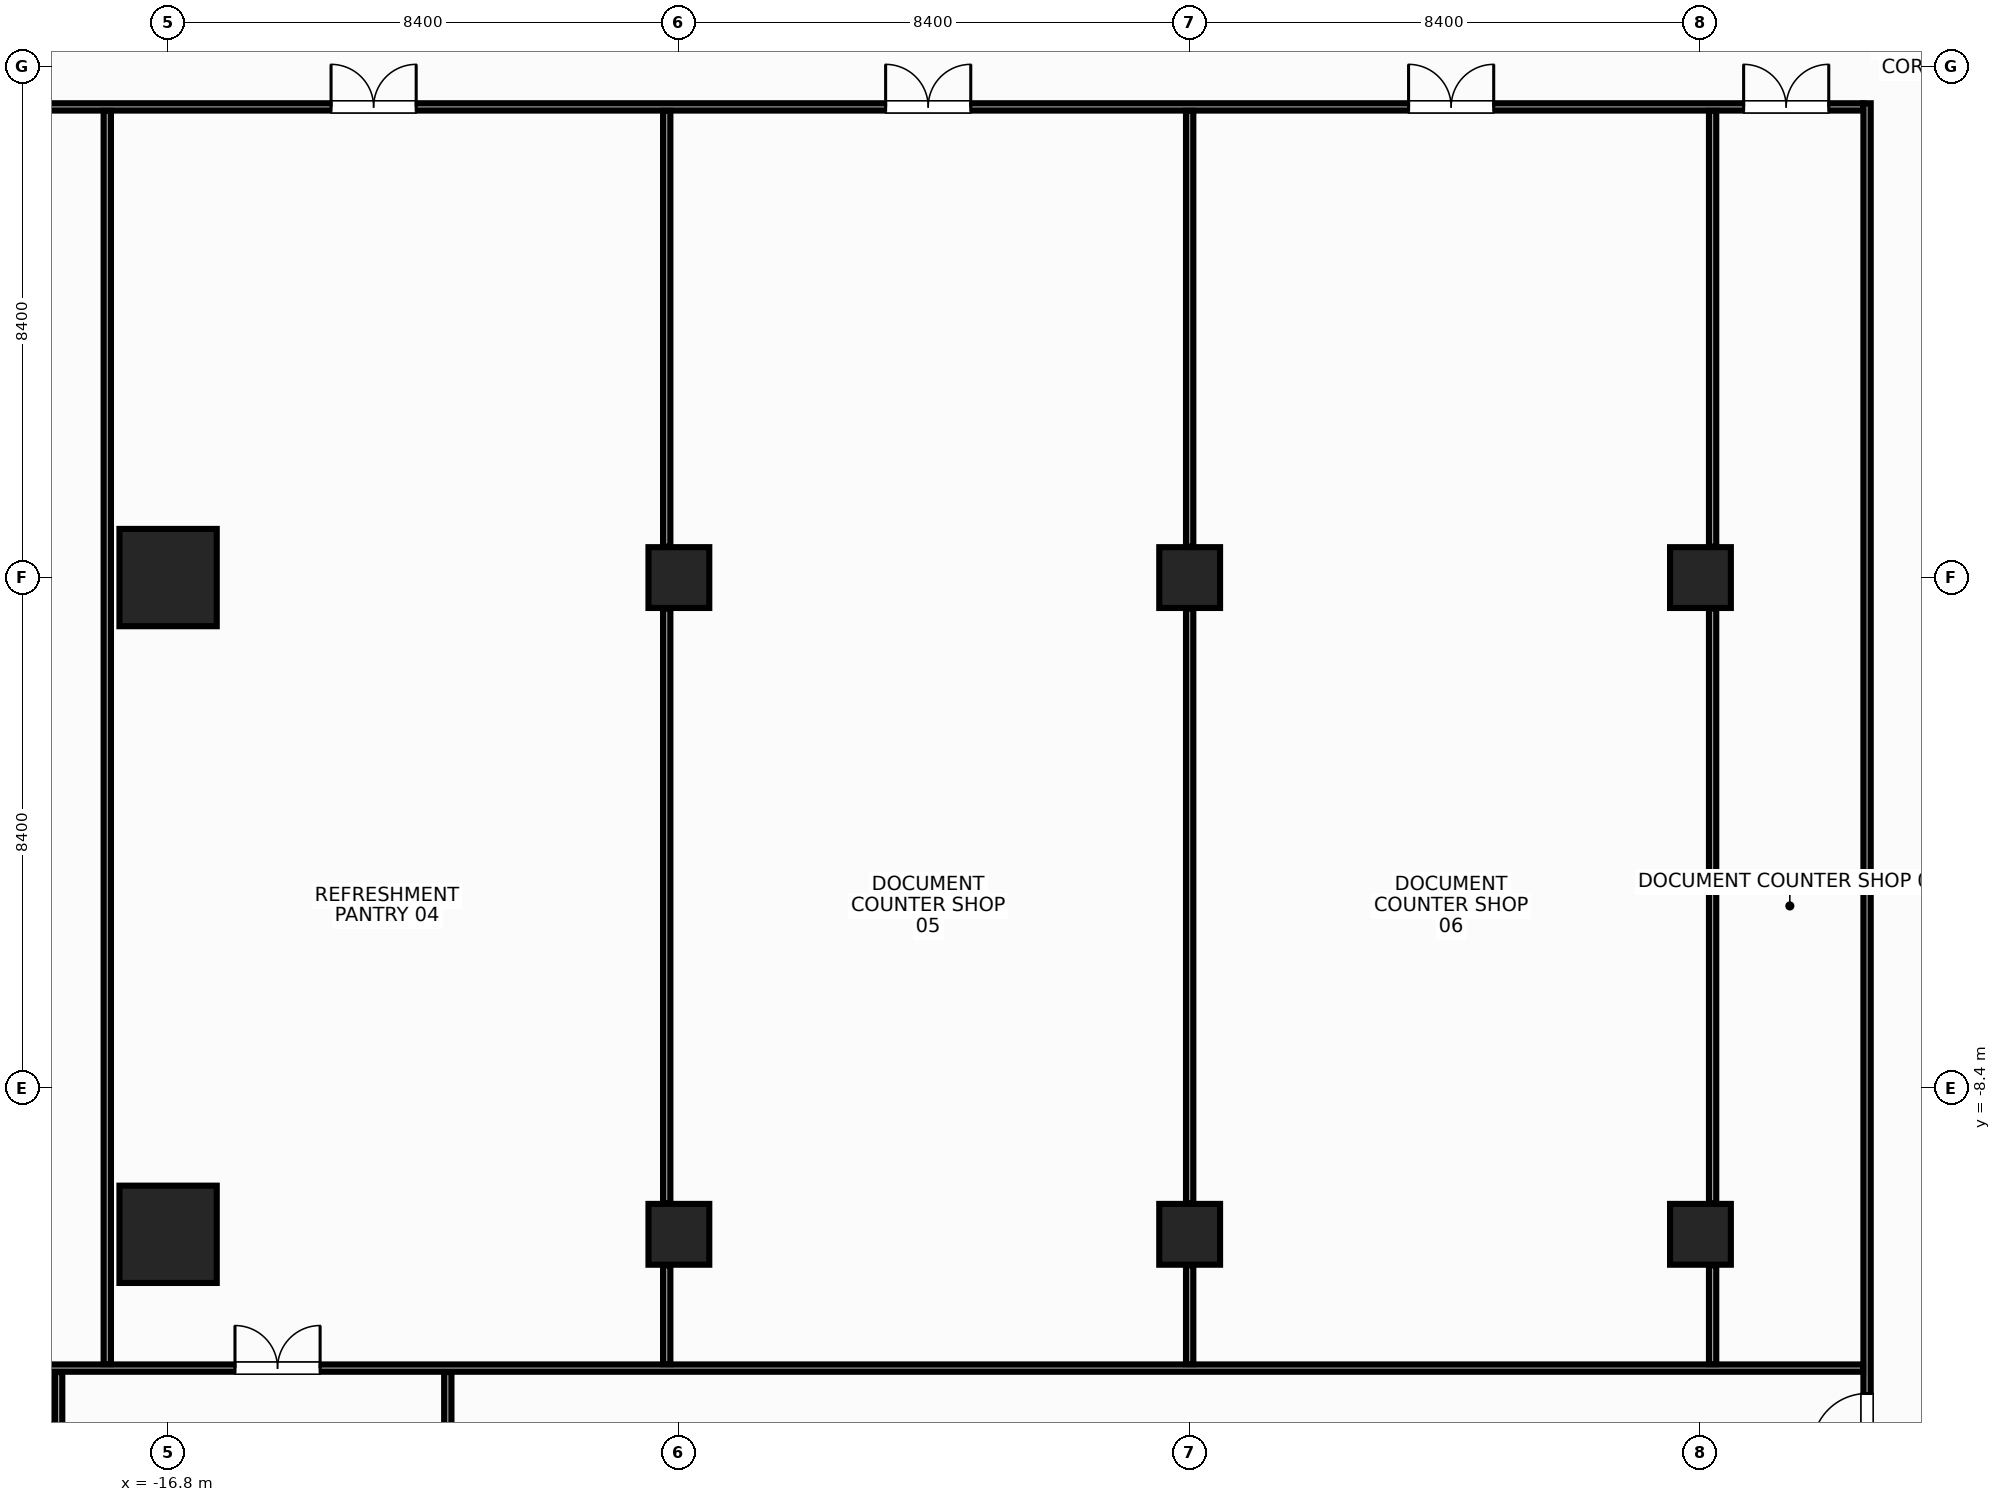
"""IFC4 building model, lengths in metres.
Left out: names, types, materials, properties, quantities, classifications, styles, units other than length and angle.
Written with IfcOpenShell. Run it as: python <this file> out.ifc"""

import sys

from ifc_helpers import new_model, si_unit, direction, frame, frame_2d, origin, origin_2d, place, context, subcontext, project, spatial, rectangle, hollow_rectangle, extrude, source, transform, mapped, element, fill, save


model = new_model("IFC4")
c1 = context("Model", 3, precision=1e-05, world=origin(), true_north=direction((0.0, 1.0)))
c2 = subcontext(c1, "Body", "Model", "MODEL_VIEW")
j1 = project(units=[si_unit("LENGTHUNIT", "METRE"), si_unit("PLANEANGLEUNIT", "RADIAN")], contexts=[c1])
p1 = place(None, origin())
s1 = spatial("IfcSite", under=j1, at=p1, CompositionType="ELEMENT")
p2 = place(p1, origin())
s2 = spatial("IfcBuilding", under=s1, at=p2, CompositionType="ELEMENT")
p3 = place(p2, frame((0.0, 0.0, 182.0)))
s3 = spatial("IfcBuildingStorey", under=s2, at=p3, CompositionType="ELEMENT", Elevation=182.0)
m1 = source(origin(), c2, "Body", "SweptSolid", [
    extrude(rectangle(XDim=1.6, YDim=1.6, at=origin_2d()), origin(), (0.0, 0.0, 1.0), 3.6),
])
for number, where, z_axis, x_axis in (
    (1, (-16.8, -10.8, 0.0), (0.0, 0.0, 1.0), (1.0, 0.0, 0.0)),
    (2, (-16.8, 0.0, 0.0), (0.0, 0.0, 1.0), (1.0, 0.0, 0.0)),
):
    element("IfcColumn", number, at=place(p3, frame(where, z_axis=z_axis, x_axis=x_axis)), inside=s3, PredefinedType="COLUMN", context=c2, shape_type="MappedRepresentation", body=[
        mapped(m1, transform((0.0, 0.0, 0.0), x_axis=(1.0, 0.0, 0.0), y_axis=(0.0, 1.0, 0.0), z_axis=(0.0, 0.0, 1.0), scale=1.0)),
    ])
m2 = source(origin(), c2, "Body", "SweptSolid", [
    extrude(hollow_rectangle(XDim=1.0, YDim=1.0, WallThickness=0.045, at=origin_2d()), origin(), (0.0, 0.0, 1.0), 3.6),
])
for number, where, z_axis, x_axis in (
    (3, (-8.4, 0.0, 0.0), (0.0, 0.0, 1.0), (1.0, 0.0, 0.0)),
    (4, (-8.4, -10.8, 0.0), (0.0, 0.0, 1.0), (1.0, 0.0, 0.0)),
    (5, (8.4, 0.0, 0.0), (0.0, 0.0, 1.0), (1.0, 0.0, 0.0)),
    (6, (8.4, -10.8, 0.0), (0.0, 0.0, 1.0), (1.0, 0.0, 0.0)),
):
    element("IfcColumn", number, at=place(p3, frame(where, z_axis=z_axis, x_axis=x_axis)), inside=s3, PredefinedType="COLUMN", context=c2, shape_type="MappedRepresentation", body=[
        mapped(m2, transform((0.0, 0.0, 0.0), x_axis=(1.0, 0.0, 0.0), y_axis=(0.0, 1.0, 0.0), z_axis=(0.0, 0.0, 1.0), scale=1.0)),
    ])
m3 = source(origin(), c2, "Body", "SweptSolid", [
    extrude(rectangle(XDim=1.0, YDim=1.0, at=origin_2d()), origin(), (0.0, 0.0, 1.0), 3.6),
])
for number, where, z_axis, x_axis in (
    (7, (0.0, -10.8, 0.0), (0.0, 0.0, 1.0), (1.0, 0.0, 0.0)),
    (8, (0.0, 0.0, 0.0), (0.0, 0.0, 1.0), (1.0, 0.0, 0.0)),
):
    element("IfcColumn", number, at=place(p3, frame(where, z_axis=z_axis, x_axis=x_axis)), inside=s3, PredefinedType="COLUMN", context=c2, shape_type="MappedRepresentation", body=[
        mapped(m3, transform((0.0, 0.0, 0.0), x_axis=(1.0, 0.0, 0.0), y_axis=(0.0, 1.0, 0.0), z_axis=(0.0, 0.0, 1.0), scale=1.0)),
    ])
m4 = source(origin(), c2, "Body", "SweptSolid", [
    extrude(rectangle(XDim=31.6, YDim=0.12, at=frame_2d((15.8, 0.0))), origin(), (0.0, 0.0, 1.0), 2.765),
])
p4 = place(p3, frame((-20.52, 7.74, 0.0), z_axis=(0.0, 0.0, 1.0), x_axis=(1.0, 0.0, 0.0)))
e9 = element("IfcWall", 9, at=p4, inside=s3, PredefinedType="PARTITIONING", context=c2, shape_type="MappedRepresentation", body=[
    mapped(m4, transform((0.0, 0.0, 0.0), x_axis=(1.0, 0.0, 0.0), y_axis=(0.0, 1.0, 0.0), z_axis=(0.0, 0.0, 1.0), scale=1.0)),
])
p5 = place(p4, frame((0.5, 0.0, 0.0)))
e10 = element("IfcOpeningElement", 10, at=p5, cuts=e9, PredefinedType="OPENING", context=c2, shape_type="SweptSolid", body=[
    extrude(rectangle(XDim=0.9, YDim=2.15, at=frame_2d((0.45, 1.075))), frame((0.0, 0.072, 0.0), z_axis=(0.0, -1.0, 0.0), x_axis=(1.0, 0.0, 0.0)), (0.0, 0.0, 1.0), 0.144),
])
p6 = place(p4, frame((6.4, 0.0, 0.0)))
e11 = element("IfcOpeningElement", 11, at=p6, cuts=e9, PredefinedType="OPENING", context=c2, shape_type="SweptSolid", body=[
    extrude(rectangle(XDim=1.4, YDim=2.2, at=frame_2d((0.7, 1.1))), frame((0.0, 0.072, 0.0), z_axis=(0.0, -1.0, 0.0), x_axis=(1.0, 0.0, 0.0)), (0.0, 0.0, 1.0), 0.144),
])
p7 = place(p4, frame((15.52, 0.0, 0.0)))
e12 = element("IfcOpeningElement", 12, at=p7, cuts=e9, PredefinedType="OPENING", context=c2, shape_type="SweptSolid", body=[
    extrude(rectangle(XDim=1.4, YDim=2.2, at=frame_2d((0.7, 1.1))), frame((0.0, 0.072, 0.0), z_axis=(0.0, -1.0, 0.0), x_axis=(1.0, 0.0, 0.0)), (0.0, 0.0, 1.0), 0.144),
])
p8 = place(p4, frame((24.12, 0.0, 0.0)))
e13 = element("IfcOpeningElement", 13, at=p8, cuts=e9, PredefinedType="OPENING", context=c2, shape_type="SweptSolid", body=[
    extrude(rectangle(XDim=1.4, YDim=2.2, at=frame_2d((0.7, 1.1))), frame((0.0, 0.072, 0.0), z_axis=(0.0, -1.0, 0.0), x_axis=(1.0, 0.0, 0.0)), (0.0, 0.0, 1.0), 0.144),
])
p9 = place(p4, frame((29.63, 0.0, 0.0)))
e14 = element("IfcOpeningElement", 14, at=p9, cuts=e9, PredefinedType="OPENING", context=c2, shape_type="SweptSolid", body=[
    extrude(rectangle(XDim=1.4, YDim=2.2, at=frame_2d((0.7, 1.1))), frame((0.0, 0.072, 0.0), z_axis=(0.0, -1.0, 0.0), x_axis=(1.0, 0.0, 0.0)), (0.0, 0.0, 1.0), 0.144),
])
m5 = source(origin(), c2, "Body", "SweptSolid", [
    extrude(rectangle(XDim=22.595, YDim=0.12, at=frame_2d((11.297, 0.0))), origin(), (0.0, 0.0, 1.0), 2.665),
])
p10 = place(p3, frame((11.14, -14.795, 0.0), z_axis=(0.0, 0.0, 1.0), x_axis=(0.0, 1.0, 0.0)))
e15 = element("IfcWall", 15, at=p10, inside=s3, PredefinedType="PARTITIONING", context=c2, shape_type="MappedRepresentation", body=[
    mapped(m5, transform((0.0, 0.0, 0.0), x_axis=(1.0, 0.0, 0.0), y_axis=(0.0, 1.0, 0.0), z_axis=(0.0, 0.0, 1.0), scale=1.0)),
])
p11 = place(p10, frame((0.478, 0.0, 0.0)))
e16 = element("IfcOpeningElement", 16, at=p11, cuts=e15, PredefinedType="OPENING", context=c2, shape_type="SweptSolid", body=[
    extrude(rectangle(XDim=0.9, YDim=2.15, at=frame_2d((0.45, 1.075))), frame((0.0, 0.072, 0.0), z_axis=(0.0, -1.0, 0.0), x_axis=(1.0, 0.0, 0.0)), (0.0, 0.0, 1.0), 0.144),
])
m6 = source(origin(), c2, "Body", "SweptSolid", [
    extrude(rectangle(XDim=34.925, YDim=0.12, at=frame_2d((17.462, 0.0))), origin(), (0.0, 0.0, 1.0), 2.965),
])
p12 = place(p3, frame((-23.85, -13.0, 0.0), z_axis=(0.0, 0.0, 1.0), x_axis=(1.0, 0.0, 0.0)))
e17 = element("IfcWall", 17, at=p12, inside=s3, PredefinedType="PARTITIONING", context=c2, shape_type="MappedRepresentation", body=[
    mapped(m6, transform((0.0, 0.0, 0.0), x_axis=(1.0, 0.0, 0.0), y_axis=(0.0, 1.0, 0.0), z_axis=(0.0, 0.0, 1.0), scale=1.0)),
])
p13 = place(p12, frame((1.515, 0.0, 0.0)))
e18 = element("IfcOpeningElement", 18, at=p13, cuts=e17, PredefinedType="OPENING", context=c2, shape_type="SweptSolid", body=[
    extrude(rectangle(XDim=1.4, YDim=2.2, at=frame_2d((0.7, 1.1))), frame((0.0, 0.072, 0.0), z_axis=(0.0, -1.0, 0.0), x_axis=(1.0, 0.0, 0.0)), (0.0, 0.0, 1.0), 0.144),
])
p14 = place(p12, frame((8.15, 0.0, 0.0)))
e19 = element("IfcOpeningElement", 19, at=p14, cuts=e17, PredefinedType="OPENING", context=c2, shape_type="SweptSolid", body=[
    extrude(rectangle(XDim=1.4, YDim=2.2, at=frame_2d((0.7, 1.1))), frame((0.0, 0.072, 0.0), z_axis=(0.0, -1.0, 0.0), x_axis=(1.0, 0.0, 0.0)), (0.0, 0.0, 1.0), 0.144),
])
m7 = source(origin(), c2, "Body", "SweptSolid", [
    extrude(rectangle(XDim=20.61, YDim=0.12, at=frame_2d((10.305, 0.0))), origin(), (0.0, 0.0, 1.0), 2.915),
])
p15 = place(p3, frame((-17.8, -12.935, 0.0), z_axis=(0.0, 0.0, 1.0), x_axis=(0.0, 1.0, 0.0)))
e20 = element("IfcWall", 20, at=p15, inside=s3, PredefinedType="PARTITIONING", context=c2, shape_type="MappedRepresentation", body=[
    mapped(m7, transform((0.0, 0.0, 0.0), x_axis=(1.0, 0.0, 0.0), y_axis=(0.0, 1.0, 0.0), z_axis=(0.0, 0.0, 1.0), scale=1.0)),
])
m8 = source(origin(), c2, "Body", "SweptSolid", [
    extrude(rectangle(XDim=1.625, YDim=0.12, at=frame_2d((0.812, 0.0))), origin(), (0.0, 0.0, 1.0), 2.965),
])
p16 = place(p3, frame((-8.6, -12.935, 0.0), z_axis=(0.0, 0.0, 1.0), x_axis=(0.0, 1.0, 0.0)))
e21 = element("IfcWall", 21, at=p16, inside=s3, PredefinedType="PARTITIONING", context=c2, shape_type="MappedRepresentation", body=[
    mapped(m8, transform((0.0, 0.0, 0.0), x_axis=(1.0, 0.0, 0.0), y_axis=(0.0, 1.0, 0.0), z_axis=(0.0, 0.0, 1.0), scale=1.0)),
])
m9 = source(origin(), c2, "Body", "SweptSolid", [
    extrude(rectangle(XDim=9.78, YDim=0.12, at=frame_2d((4.89, 0.0))), origin(), (0.0, 0.0, 1.0), 2.765),
])
p17 = place(p3, frame((-8.6, -10.29, 0.0), z_axis=(0.0, 0.0, 1.0), x_axis=(0.0, 1.0, 0.0)))
e22 = element("IfcWall", 22, at=p17, inside=s3, PredefinedType="PARTITIONING", context=c2, shape_type="MappedRepresentation", body=[
    mapped(m9, transform((0.0, 0.0, 0.0), x_axis=(1.0, 0.0, 0.0), y_axis=(0.0, 1.0, 0.0), z_axis=(0.0, 0.0, 1.0), scale=1.0)),
])
m10 = source(origin(), c2, "Body", "SweptSolid", [
    extrude(rectangle(XDim=7.165, YDim=0.12, at=frame_2d((3.583, 0.0))), origin(), (0.0, 0.0, 1.0), 2.665),
])
p18 = place(p3, frame((-8.6, 0.51, 0.0), z_axis=(0.0, 0.0, 1.0), x_axis=(0.0, 1.0, 0.0)))
e23 = element("IfcWall", 23, at=p18, inside=s3, PredefinedType="PARTITIONING", context=c2, shape_type="MappedRepresentation", body=[
    mapped(m10, transform((0.0, 0.0, 0.0), x_axis=(1.0, 0.0, 0.0), y_axis=(0.0, 1.0, 0.0), z_axis=(0.0, 0.0, 1.0), scale=1.0)),
])
p19 = place(p3, frame((0.0, -12.935, 0.0), z_axis=(0.0, 0.0, 1.0), x_axis=(0.0, 1.0, 0.0)))
e24 = element("IfcWall", 24, at=p19, inside=s3, PredefinedType="PARTITIONING", context=c2, shape_type="MappedRepresentation", body=[
    mapped(m8, transform((0.0, 0.0, 0.0), x_axis=(1.0, 0.0, 0.0), y_axis=(0.0, 1.0, 0.0), z_axis=(0.0, 0.0, 1.0), scale=1.0)),
])
p20 = place(p3, frame((0.0, -10.29, 0.0), z_axis=(0.0, 0.0, 1.0), x_axis=(0.0, 1.0, 0.0)))
e25 = element("IfcWall", 25, at=p20, inside=s3, PredefinedType="PARTITIONING", context=c2, shape_type="MappedRepresentation", body=[
    mapped(m9, transform((0.0, 0.0, 0.0), x_axis=(1.0, 0.0, 0.0), y_axis=(0.0, 1.0, 0.0), z_axis=(0.0, 0.0, 1.0), scale=1.0)),
])
p21 = place(p3, frame((0.0, 0.51, 0.0), z_axis=(0.0, 0.0, 1.0), x_axis=(0.0, 1.0, 0.0)))
e26 = element("IfcWall", 26, at=p21, inside=s3, PredefinedType="PARTITIONING", context=c2, shape_type="MappedRepresentation", body=[
    mapped(m10, transform((0.0, 0.0, 0.0), x_axis=(1.0, 0.0, 0.0), y_axis=(0.0, 1.0, 0.0), z_axis=(0.0, 0.0, 1.0), scale=1.0)),
])
p22 = place(p3, frame((8.6, -12.935, 0.0), z_axis=(0.0, 0.0, 1.0), x_axis=(0.0, 1.0, 0.0)))
e27 = element("IfcWall", 27, at=p22, inside=s3, PredefinedType="PARTITIONING", context=c2, shape_type="MappedRepresentation", body=[
    mapped(m8, transform((0.0, 0.0, 0.0), x_axis=(1.0, 0.0, 0.0), y_axis=(0.0, 1.0, 0.0), z_axis=(0.0, 0.0, 1.0), scale=1.0)),
])
p23 = place(p3, frame((8.6, -10.29, 0.0), z_axis=(0.0, 0.0, 1.0), x_axis=(0.0, 1.0, 0.0)))
e28 = element("IfcWall", 28, at=p23, inside=s3, PredefinedType="PARTITIONING", context=c2, shape_type="MappedRepresentation", body=[
    mapped(m9, transform((0.0, 0.0, 0.0), x_axis=(1.0, 0.0, 0.0), y_axis=(0.0, 1.0, 0.0), z_axis=(0.0, 0.0, 1.0), scale=1.0)),
])
p24 = place(p3, frame((8.6, 0.51, 0.0), z_axis=(0.0, 0.0, 1.0), x_axis=(0.0, 1.0, 0.0)))
e29 = element("IfcWall", 29, at=p24, inside=s3, PredefinedType="PARTITIONING", context=c2, shape_type="MappedRepresentation", body=[
    mapped(m10, transform((0.0, 0.0, 0.0), x_axis=(1.0, 0.0, 0.0), y_axis=(0.0, 1.0, 0.0), z_axis=(0.0, 0.0, 1.0), scale=1.0)),
])
m11 = source(origin(), c2, "Body", "SweptSolid", [
    extrude(rectangle(XDim=4.597, YDim=0.12, at=frame_2d((2.299, 0.0))), origin(), (0.0, 0.0, 1.0), 3.38),
])
p25 = place(p3, frame((-18.6, -17.662, 0.0), z_axis=(0.0, 0.0, 1.0), x_axis=(0.0, 1.0, 0.0)))
e30 = element("IfcWall", 30, at=p25, inside=s3, PredefinedType="PARTITIONING", context=c2, shape_type="MappedRepresentation", body=[
    mapped(m11, transform((0.0, 0.0, 0.0), x_axis=(1.0, 0.0, 0.0), y_axis=(0.0, 1.0, 0.0), z_axis=(0.0, 0.0, 1.0), scale=1.0)),
])
m12 = source(origin(), c2, "Body", "SweptSolid", [
    extrude(rectangle(XDim=9.585, YDim=0.12, at=frame_2d((4.792, 0.0))), origin(), (0.0, 0.0, 1.0), 2.915),
])
p26 = place(p3, frame((-12.2, -22.65, 0.0), z_axis=(0.0, 0.0, 1.0), x_axis=(0.0, 1.0, 0.0)))
e31 = element("IfcWall", 31, at=p26, inside=s3, PredefinedType="PARTITIONING", context=c2, shape_type="MappedRepresentation", body=[
    mapped(m12, transform((0.0, 0.0, 0.0), x_axis=(1.0, 0.0, 0.0), y_axis=(0.0, 1.0, 0.0), z_axis=(0.0, 0.0, 1.0), scale=1.0)),
])
m13 = source(origin(), c2, "Body", "SweptSolid", [
    extrude(rectangle(XDim=1.4, YDim=2.2, at=frame_2d((0.7, 1.1))), frame((0.0, 0.025, 0.0), z_axis=(0.0, -1.0, 0.0), x_axis=(1.0, 0.0, 0.0)), (0.0, 0.0, 1.0), 0.05),
])
p27 = place(p6, origin())
e32 = element("IfcDoor", 32, at=p27, inside=s3, OperationType="DOUBLE_DOOR_SINGLE_SWING", PredefinedType="DOOR", context=c2, shape_type="MappedRepresentation", body=[
    mapped(m13, transform((0.0, 0.0, 0.0), x_axis=(1.0, 0.0, 0.0), y_axis=(0.0, 1.0, 0.0), z_axis=(0.0, 0.0, 1.0), scale=1.0)),
])
fill(e11, e32)
p28 = place(p7, origin())
e33 = element("IfcDoor", 33, at=p28, inside=s3, OperationType="DOUBLE_DOOR_SINGLE_SWING", PredefinedType="DOOR", context=c2, shape_type="MappedRepresentation", body=[
    mapped(m13, transform((0.0, 0.0, 0.0), x_axis=(1.0, 0.0, 0.0), y_axis=(0.0, 1.0, 0.0), z_axis=(0.0, 0.0, 1.0), scale=1.0)),
])
fill(e12, e33)
p29 = place(p8, origin())
e34 = element("IfcDoor", 34, at=p29, inside=s3, OperationType="DOUBLE_DOOR_SINGLE_SWING", PredefinedType="DOOR", context=c2, shape_type="MappedRepresentation", body=[
    mapped(m13, transform((0.0, 0.0, 0.0), x_axis=(1.0, 0.0, 0.0), y_axis=(0.0, 1.0, 0.0), z_axis=(0.0, 0.0, 1.0), scale=1.0)),
])
fill(e13, e34)
p30 = place(p9, origin())
e35 = element("IfcDoor", 35, at=p30, inside=s3, OperationType="DOUBLE_DOOR_SINGLE_SWING", PredefinedType="DOOR", context=c2, shape_type="MappedRepresentation", body=[
    mapped(m13, transform((0.0, 0.0, 0.0), x_axis=(1.0, 0.0, 0.0), y_axis=(0.0, 1.0, 0.0), z_axis=(0.0, 0.0, 1.0), scale=1.0)),
])
fill(e14, e35)
m14 = source(origin(), c2, "Body", "SweptSolid", [
    extrude(rectangle(XDim=0.9, YDim=2.15, at=frame_2d((0.45, 1.075))), frame((0.0, 0.025, 0.0), z_axis=(0.0, -1.0, 0.0), x_axis=(1.0, 0.0, 0.0)), (0.0, 0.0, 1.0), 0.05),
])
p31 = place(p11, origin())
e36 = element("IfcDoor", 36, at=p31, inside=s3, OperationType="SINGLE_SWING_LEFT", PredefinedType="DOOR", context=c2, shape_type="MappedRepresentation", body=[
    mapped(m14, transform((0.0, 0.0, 0.0), x_axis=(1.0, 0.0, 0.0), y_axis=(0.0, 1.0, 0.0), z_axis=(0.0, 0.0, 1.0), scale=1.0)),
])
fill(e16, e36)
p32 = place(p14, origin())
e37 = element("IfcDoor", 37, at=p32, inside=s3, OperationType="DOUBLE_DOOR_SINGLE_SWING", PredefinedType="DOOR", context=c2, shape_type="MappedRepresentation", body=[
    mapped(m13, transform((0.0, 0.0, 0.0), x_axis=(1.0, 0.0, 0.0), y_axis=(0.0, 1.0, 0.0), z_axis=(0.0, 0.0, 1.0), scale=1.0)),
])
fill(e19, e37)
save(model, sys.argv[1])
